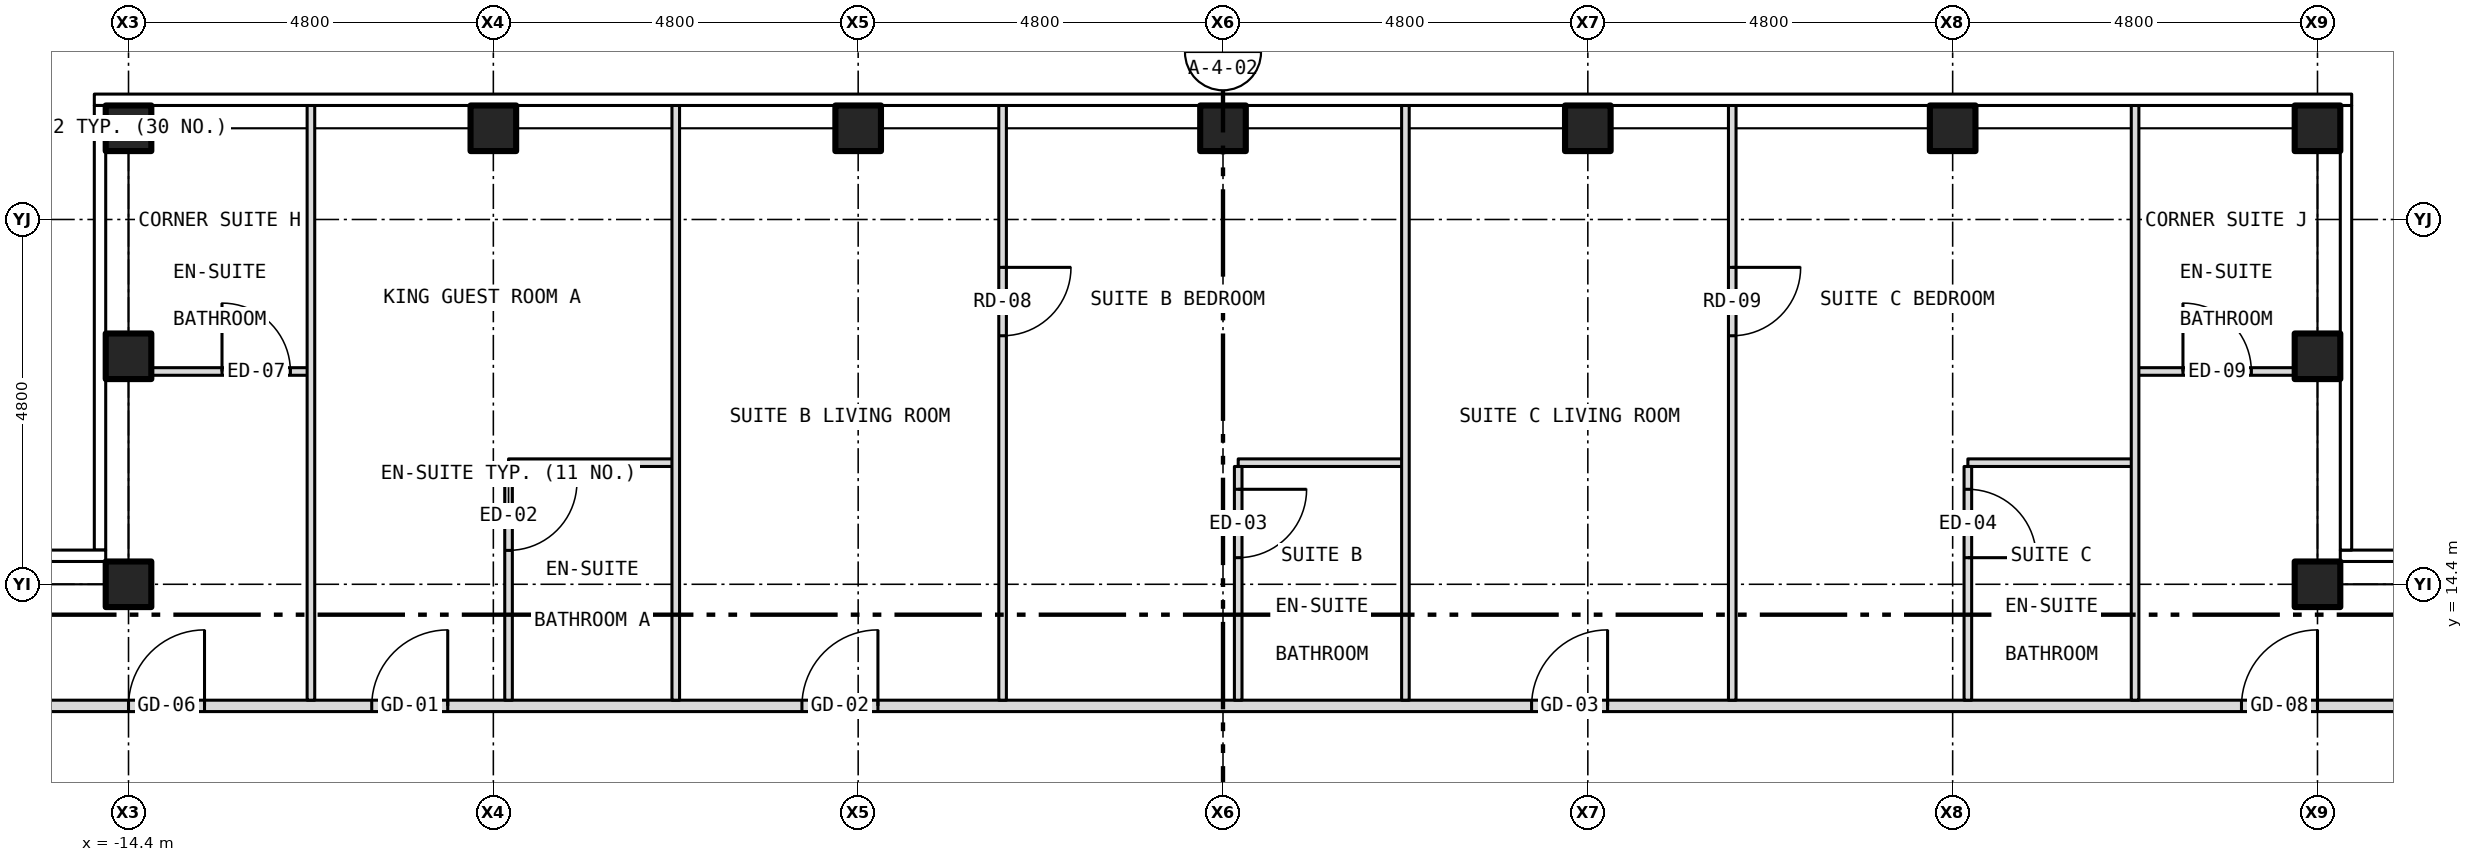
"""IFC4 building model, lengths in metres.
Left out: names, types, materials, properties, quantities, classifications, styles, units other than length and angle.
Written with IfcOpenShell. Run it as: python <this file> out.ifc"""

import sys

from ifc_helpers import new_model, si_unit, direction, frame, frame_2d, origin, origin_2d, place, context, subcontext, project, spatial, rectangle, hollow_rectangle, extrude, element, fill, save


model = new_model("IFC4")
c1 = context("Model", 3, precision=1e-05, world=origin(), true_north=direction((0.0, 1.0)))
c2 = subcontext(c1, "Body", "Model", "MODEL_VIEW")
j1 = project(units=[si_unit("LENGTHUNIT", "METRE"), si_unit("PLANEANGLEUNIT", "RADIAN")], contexts=[c1])
p1 = place(None, origin())
s1 = spatial("IfcSite", under=j1, at=p1, CompositionType="ELEMENT")
p2 = place(p1, origin())
s2 = spatial("IfcBuilding", under=s1, at=p2, CompositionType="ELEMENT")
p3 = place(p2, frame((0.0, 0.0, 251.5)))
s3 = spatial("IfcBuildingStorey", under=s2, at=p3, CompositionType="ELEMENT", Elevation=251.5)
for number, where, z_axis, x_axis in (
    (1, (-14.4, 20.4, -0.15), (0.0, 0.0, 1.0), (1.0, 0.0, 0.0)),
    (2, (-9.6, 20.4, -0.15), (0.0, 0.0, 1.0), (1.0, 0.0, 0.0)),
    (3, (-4.8, 20.4, -0.15), (0.0, 0.0, 1.0), (1.0, 0.0, 0.0)),
    (4, (0.0, 20.4, -0.15), (0.0, 0.0, 1.0), (1.0, 0.0, 0.0)),
    (5, (4.8, 20.4, -0.15), (0.0, 0.0, 1.0), (1.0, 0.0, 0.0)),
    (6, (9.6, 20.4, -0.15), (0.0, 0.0, 1.0), (1.0, 0.0, 0.0)),
    (7, (14.4, 20.4, -0.15), (0.0, 0.0, 1.0), (1.0, 0.0, 0.0)),
    (8, (-14.4, 14.4, -0.15), (0.0, 0.0, 1.0), (1.0, 0.0, 0.0)),
    (9, (-14.4, 17.4, -0.15), (0.0, 0.0, 1.0), (1.0, 0.0, 0.0)),
    (10, (14.4, 14.4, -0.15), (0.0, 0.0, 1.0), (1.0, 0.0, 0.0)),
    (11, (14.4, 17.4, -0.15), (0.0, 0.0, 1.0), (1.0, 0.0, 0.0)),
):
    element("IfcColumn", number, at=place(p3, frame(where, z_axis=z_axis, x_axis=x_axis)), inside=s3, PredefinedType="COLUMN", context=c2, shape_type="SweptSolid", body=[
        extrude(hollow_rectangle(XDim=0.6, YDim=0.6, WallThickness=0.03, at=origin_2d()), origin(), (0.0, 0.0, 1.0), 3.5),
    ])
p4 = place(p3, frame((-15.8, 12.8, 0.0), z_axis=(0.0, 0.0, 1.0), x_axis=(1.0, 0.0, 0.0)))
e12 = element("IfcWall", 12, at=p4, inside=s3, PredefinedType="PARTITIONING", context=c2, shape_type="SweptSolid", body=[
    extrude(rectangle(XDim=31.6, YDim=0.15, at=frame_2d((15.8, 0.0))), origin(), (0.0, 0.0, 1.0), 3.35),
])
p5 = place(p4, frame((4.6, 0.0, 0.0)))
e13 = element("IfcOpeningElement", 13, at=p5, cuts=e12, PredefinedType="OPENING", context=c2, shape_type="SweptSolid", body=[
    extrude(rectangle(XDim=1.0, YDim=2.1, at=frame_2d((0.5, 1.05))), frame((0.0, 0.087, 0.0), z_axis=(0.0, -1.0, 0.0), x_axis=(1.0, 0.0, 0.0)), (0.0, 0.0, 1.0), 0.174),
])
p6 = place(p4, frame((10.26, 0.0, 0.0)))
e14 = element("IfcOpeningElement", 14, at=p6, cuts=e12, PredefinedType="OPENING", context=c2, shape_type="SweptSolid", body=[
    extrude(rectangle(XDim=1.0, YDim=2.1, at=frame_2d((0.5, 1.05))), frame((0.0, 0.087, 0.0), z_axis=(0.0, -1.0, 0.0), x_axis=(1.0, 0.0, 0.0)), (0.0, 0.0, 1.0), 0.174),
])
p7 = place(p4, frame((19.86, 0.0, 0.0)))
e15 = element("IfcOpeningElement", 15, at=p7, cuts=e12, PredefinedType="OPENING", context=c2, shape_type="SweptSolid", body=[
    extrude(rectangle(XDim=1.0, YDim=2.1, at=frame_2d((0.5, 1.05))), frame((0.0, 0.087, 0.0), z_axis=(0.0, -1.0, 0.0), x_axis=(1.0, 0.0, 0.0)), (0.0, 0.0, 1.0), 0.174),
])
p8 = place(p4, frame((1.4, 0.0, 0.0)))
e16 = element("IfcOpeningElement", 16, at=p8, cuts=e12, PredefinedType="OPENING", context=c2, shape_type="SweptSolid", body=[
    extrude(rectangle(XDim=1.0, YDim=2.1, at=frame_2d((0.5, 1.05))), frame((0.0, 0.087, 0.0), z_axis=(0.0, -1.0, 0.0), x_axis=(1.0, 0.0, 0.0)), (0.0, 0.0, 1.0), 0.174),
])
p9 = place(p4, frame((29.2, 0.0, 0.0)))
e17 = element("IfcOpeningElement", 17, at=p9, cuts=e12, PredefinedType="OPENING", context=c2, shape_type="SweptSolid", body=[
    extrude(rectangle(XDim=1.0, YDim=2.1, at=frame_2d((0.5, 1.05))), frame((0.0, 0.087, 0.0), z_axis=(0.0, -1.0, 0.0), x_axis=(1.0, 0.0, 0.0)), (0.0, 0.0, 1.0), 0.174),
])
for number, where, z_axis, x_axis in (
    (18, (-9.4, 16.0, 0.0), (0.0, 0.0, 1.0), (1.0, 0.0, 0.0)),
    (19, (0.2, 16.0, 0.0), (0.0, 0.0, 1.0), (1.0, 0.0, 0.0)),
    (20, (9.8, 16.0, 0.0), (0.0, 0.0, 1.0), (1.0, 0.0, 0.0)),
):
    element("IfcWall", number, at=place(p3, frame(where, z_axis=z_axis, x_axis=x_axis)), inside=s3, PredefinedType="PARTITIONING", context=c2, shape_type="SweptSolid", body=[
        extrude(rectangle(XDim=2.2, YDim=0.1, at=frame_2d((1.1, 0.0))), origin(), (0.0, 0.0, 1.0), 3.35),
    ])
p10 = place(p3, frame((-14.28, 17.2, 0.0), z_axis=(0.0, 0.0, 1.0), x_axis=(1.0, 0.0, 0.0)))
e21 = element("IfcWall", 21, at=p10, inside=s3, PredefinedType="PARTITIONING", context=c2, shape_type="SweptSolid", body=[
    extrude(rectangle(XDim=2.28, YDim=0.1, at=frame_2d((1.14, 0.0))), origin(), (0.0, 0.0, 1.0), 3.35),
])
p11 = place(p10, frame((1.11, 0.0, 0.0)))
e22 = element("IfcOpeningElement", 22, at=p11, cuts=e21, PredefinedType="OPENING", context=c2, shape_type="SweptSolid", body=[
    extrude(rectangle(XDim=0.9, YDim=2.1, at=frame_2d((0.45, 1.05))), frame((0.0, 0.062, 0.0), z_axis=(0.0, -1.0, 0.0), x_axis=(1.0, 0.0, 0.0)), (0.0, 0.0, 1.0), 0.124),
])
p12 = place(p3, frame((12.0, 17.2, 0.0), z_axis=(0.0, 0.0, 1.0), x_axis=(1.0, 0.0, 0.0)))
e23 = element("IfcWall", 23, at=p12, inside=s3, PredefinedType="PARTITIONING", context=c2, shape_type="SweptSolid", body=[
    extrude(rectangle(XDim=2.28, YDim=0.1, at=frame_2d((1.14, 0.0))), origin(), (0.0, 0.0, 1.0), 3.35),
])
p13 = place(p12, frame((0.63, 0.0, 0.0)))
e24 = element("IfcOpeningElement", 24, at=p13, cuts=e23, PredefinedType="OPENING", context=c2, shape_type="SweptSolid", body=[
    extrude(rectangle(XDim=0.9, YDim=2.1, at=frame_2d((0.45, 1.05))), frame((0.0, 0.062, 0.0), z_axis=(0.0, -1.0, 0.0), x_axis=(1.0, 0.0, 0.0)), (0.0, 0.0, 1.0), 0.124),
])
p14 = place(p3, frame((-12.0, 12.875, 0.0), z_axis=(0.0, 0.0, 1.0), x_axis=(0.0, 1.0, 0.0)))
e25 = element("IfcWall", 25, at=p14, inside=s3, PredefinedType="PARTITIONING", context=c2, shape_type="SweptSolid", body=[
    extrude(rectangle(XDim=7.855, YDim=0.1, at=frame_2d((3.927, 0.0))), origin(), (0.0, 0.0, 1.0), 3.35),
])
p15 = place(p3, frame((-9.4, 12.875, 0.0), z_axis=(0.0, 0.0, 1.0), x_axis=(0.0, 1.0, 0.0)))
e26 = element("IfcWall", 26, at=p15, inside=s3, PredefinedType="PARTITIONING", context=c2, shape_type="SweptSolid", body=[
    extrude(rectangle(XDim=3.075, YDim=0.1, at=frame_2d((1.538, 0.0))), origin(), (0.0, 0.0, 1.0), 2.728),
])
p16 = place(p15, frame((1.971, 0.0, 0.0)))
e27 = element("IfcOpeningElement", 27, at=p16, cuts=e26, PredefinedType="OPENING", context=c2, shape_type="SweptSolid", body=[
    extrude(rectangle(XDim=0.9, YDim=2.1, at=frame_2d((0.45, 1.05))), frame((0.0, 0.062, 0.0), z_axis=(0.0, -1.0, 0.0), x_axis=(1.0, 0.0, 0.0)), (0.0, 0.0, 1.0), 0.124),
])
p17 = place(p3, frame((-7.2, 12.875, 0.0), z_axis=(0.0, 0.0, 1.0), x_axis=(0.0, 1.0, 0.0)))
e28 = element("IfcWall", 28, at=p17, inside=s3, PredefinedType="PARTITIONING", context=c2, shape_type="SweptSolid", body=[
    extrude(rectangle(XDim=7.855, YDim=0.1, at=frame_2d((3.927, 0.0))), origin(), (0.0, 0.0, 1.0), 3.35),
])
p18 = place(p3, frame((-2.9, 12.875, 0.0), z_axis=(0.0, 0.0, 1.0), x_axis=(0.0, 1.0, 0.0)))
e29 = element("IfcWall", 29, at=p18, inside=s3, PredefinedType="PARTITIONING", context=c2, shape_type="SweptSolid", body=[
    extrude(rectangle(XDim=7.855, YDim=0.1, at=frame_2d((3.927, 0.0))), origin(), (0.0, 0.0, 1.0), 3.35),
])
p19 = place(p18, frame((4.795, 0.0, 0.0)))
e30 = element("IfcOpeningElement", 30, at=p19, cuts=e29, PredefinedType="OPENING", context=c2, shape_type="SweptSolid", body=[
    extrude(rectangle(XDim=0.9, YDim=2.1, at=frame_2d((0.45, 1.05))), frame((0.0, 0.062, 0.0), z_axis=(0.0, -1.0, 0.0), x_axis=(1.0, 0.0, 0.0)), (0.0, 0.0, 1.0), 0.124),
])
p20 = place(p3, frame((0.2, 12.875, 0.0), z_axis=(0.0, 0.0, 1.0), x_axis=(0.0, 1.0, 0.0)))
e31 = element("IfcWall", 31, at=p20, inside=s3, PredefinedType="PARTITIONING", context=c2, shape_type="SweptSolid", body=[
    extrude(rectangle(XDim=3.075, YDim=0.1, at=frame_2d((1.538, 0.0))), origin(), (0.0, 0.0, 1.0), 2.728),
])
p21 = place(p20, frame((1.875, 0.0, 0.0)))
e32 = element("IfcOpeningElement", 32, at=p21, cuts=e31, PredefinedType="OPENING", context=c2, shape_type="SweptSolid", body=[
    extrude(rectangle(XDim=0.9, YDim=2.1, at=frame_2d((0.45, 1.05))), frame((0.0, 0.062, 0.0), z_axis=(0.0, -1.0, 0.0), x_axis=(1.0, 0.0, 0.0)), (0.0, 0.0, 1.0), 0.124),
])
p22 = place(p3, frame((2.4, 12.875, 0.0), z_axis=(0.0, 0.0, 1.0), x_axis=(0.0, 1.0, 0.0)))
e33 = element("IfcWall", 33, at=p22, inside=s3, PredefinedType="PARTITIONING", context=c2, shape_type="SweptSolid", body=[
    extrude(rectangle(XDim=7.855, YDim=0.1, at=frame_2d((3.927, 0.0))), origin(), (0.0, 0.0, 1.0), 3.35),
])
p23 = place(p3, frame((6.7, 12.875, 0.0), z_axis=(0.0, 0.0, 1.0), x_axis=(0.0, 1.0, 0.0)))
e34 = element("IfcWall", 34, at=p23, inside=s3, PredefinedType="PARTITIONING", context=c2, shape_type="SweptSolid", body=[
    extrude(rectangle(XDim=7.855, YDim=0.1, at=frame_2d((3.927, 0.0))), origin(), (0.0, 0.0, 1.0), 3.35),
])
p24 = place(p23, frame((4.795, 0.0, 0.0)))
e35 = element("IfcOpeningElement", 35, at=p24, cuts=e34, PredefinedType="OPENING", context=c2, shape_type="SweptSolid", body=[
    extrude(rectangle(XDim=0.9, YDim=2.1, at=frame_2d((0.45, 1.05))), frame((0.0, 0.062, 0.0), z_axis=(0.0, -1.0, 0.0), x_axis=(1.0, 0.0, 0.0)), (0.0, 0.0, 1.0), 0.124),
])
p25 = place(p3, frame((9.8, 12.875, 0.0), z_axis=(0.0, 0.0, 1.0), x_axis=(0.0, 1.0, 0.0)))
e36 = element("IfcWall", 36, at=p25, inside=s3, PredefinedType="PARTITIONING", context=c2, shape_type="SweptSolid", body=[
    extrude(rectangle(XDim=3.075, YDim=0.1, at=frame_2d((1.538, 0.0))), origin(), (0.0, 0.0, 1.0), 2.728),
])
p26 = place(p25, frame((1.875, 0.0, 0.0)))
e37 = element("IfcOpeningElement", 37, at=p26, cuts=e36, PredefinedType="OPENING", context=c2, shape_type="SweptSolid", body=[
    extrude(rectangle(XDim=0.9, YDim=2.1, at=frame_2d((0.45, 1.05))), frame((0.0, 0.062, 0.0), z_axis=(0.0, -1.0, 0.0), x_axis=(1.0, 0.0, 0.0)), (0.0, 0.0, 1.0), 0.124),
])
p27 = place(p3, frame((12.0, 12.875, 0.0), z_axis=(0.0, 0.0, 1.0), x_axis=(0.0, 1.0, 0.0)))
e38 = element("IfcWall", 38, at=p27, inside=s3, PredefinedType="PARTITIONING", context=c2, shape_type="SweptSolid", body=[
    extrude(rectangle(XDim=7.855, YDim=0.1, at=frame_2d((3.927, 0.0))), origin(), (0.0, 0.0, 1.0), 3.35),
])
p28 = place(p5, origin())
e39 = element("IfcDoor", 39, at=p28, inside=s3, OperationType="SINGLE_SWING_RIGHT", PredefinedType="DOOR", context=c2, shape_type="SweptSolid", body=[
    extrude(rectangle(XDim=1.0, YDim=2.1, at=frame_2d((0.5, 1.05))), frame((0.0, 0.025, 0.0), z_axis=(0.0, -1.0, 0.0), x_axis=(1.0, 0.0, 0.0)), (0.0, 0.0, 1.0), 0.05),
])
fill(e13, e39)
p29 = place(p16, origin())
e40 = element("IfcDoor", 40, at=p29, inside=s3, OperationType="SINGLE_SWING_RIGHT", PredefinedType="DOOR", context=c2, shape_type="SweptSolid", body=[
    extrude(rectangle(XDim=0.9, YDim=2.1, at=frame_2d((0.45, 1.05))), frame((0.0, 0.025, 0.0), z_axis=(0.0, -1.0, 0.0), x_axis=(1.0, 0.0, 0.0)), (0.0, 0.0, 1.0), 0.05),
])
fill(e27, e40)
p30 = place(p6, origin())
e41 = element("IfcDoor", 41, at=p30, inside=s3, OperationType="SINGLE_SWING_RIGHT", PredefinedType="DOOR", context=c2, shape_type="SweptSolid", body=[
    extrude(rectangle(XDim=1.0, YDim=2.1, at=frame_2d((0.5, 1.05))), frame((0.0, 0.025, 0.0), z_axis=(0.0, -1.0, 0.0), x_axis=(1.0, 0.0, 0.0)), (0.0, 0.0, 1.0), 0.05),
])
fill(e14, e41)
p31 = place(p19, origin())
e42 = element("IfcDoor", 42, at=p31, inside=s3, OperationType="SINGLE_SWING_RIGHT", PredefinedType="DOOR", context=c2, shape_type="SweptSolid", body=[
    extrude(rectangle(XDim=0.9, YDim=2.1, at=frame_2d((0.45, 1.05))), frame((0.0, 0.025, 0.0), z_axis=(0.0, -1.0, 0.0), x_axis=(1.0, 0.0, 0.0)), (0.0, 0.0, 1.0), 0.05),
])
fill(e30, e42)
p32 = place(p21, origin())
e43 = element("IfcDoor", 43, at=p32, inside=s3, OperationType="SINGLE_SWING_RIGHT", PredefinedType="DOOR", context=c2, shape_type="SweptSolid", body=[
    extrude(rectangle(XDim=0.9, YDim=2.1, at=frame_2d((0.45, 1.05))), frame((0.0, 0.025, 0.0), z_axis=(0.0, -1.0, 0.0), x_axis=(1.0, 0.0, 0.0)), (0.0, 0.0, 1.0), 0.05),
])
fill(e32, e43)
p33 = place(p7, origin())
e44 = element("IfcDoor", 44, at=p33, inside=s3, OperationType="SINGLE_SWING_RIGHT", PredefinedType="DOOR", context=c2, shape_type="SweptSolid", body=[
    extrude(rectangle(XDim=1.0, YDim=2.1, at=frame_2d((0.5, 1.05))), frame((0.0, 0.025, 0.0), z_axis=(0.0, -1.0, 0.0), x_axis=(1.0, 0.0, 0.0)), (0.0, 0.0, 1.0), 0.05),
])
fill(e15, e44)
p34 = place(p24, origin())
e45 = element("IfcDoor", 45, at=p34, inside=s3, OperationType="SINGLE_SWING_RIGHT", PredefinedType="DOOR", context=c2, shape_type="SweptSolid", body=[
    extrude(rectangle(XDim=0.9, YDim=2.1, at=frame_2d((0.45, 1.05))), frame((0.0, 0.025, 0.0), z_axis=(0.0, -1.0, 0.0), x_axis=(1.0, 0.0, 0.0)), (0.0, 0.0, 1.0), 0.05),
])
fill(e35, e45)
p35 = place(p26, origin())
e46 = element("IfcDoor", 46, at=p35, inside=s3, OperationType="SINGLE_SWING_LEFT", PredefinedType="DOOR", context=c2, shape_type="SweptSolid", body=[
    extrude(rectangle(XDim=0.9, YDim=2.1, at=frame_2d((0.45, 1.05))), frame((0.0, 0.025, 0.0), z_axis=(0.0, -1.0, 0.0), x_axis=(1.0, 0.0, 0.0)), (0.0, 0.0, 1.0), 0.05),
])
fill(e37, e46)
p36 = place(p11, origin())
e47 = element("IfcDoor", 47, at=p36, inside=s3, OperationType="SINGLE_SWING_LEFT", PredefinedType="DOOR", context=c2, shape_type="SweptSolid", body=[
    extrude(rectangle(XDim=0.9, YDim=2.1, at=frame_2d((0.45, 1.05))), frame((0.0, 0.025, 0.0), z_axis=(0.0, -1.0, 0.0), x_axis=(1.0, 0.0, 0.0)), (0.0, 0.0, 1.0), 0.05),
])
fill(e22, e47)
p37 = place(p8, origin())
e48 = element("IfcDoor", 48, at=p37, inside=s3, OperationType="SINGLE_SWING_RIGHT", PredefinedType="DOOR", context=c2, shape_type="SweptSolid", body=[
    extrude(rectangle(XDim=1.0, YDim=2.1, at=frame_2d((0.5, 1.05))), frame((0.0, 0.025, 0.0), z_axis=(0.0, -1.0, 0.0), x_axis=(1.0, 0.0, 0.0)), (0.0, 0.0, 1.0), 0.05),
])
fill(e16, e48)
p38 = place(p13, origin())
e49 = element("IfcDoor", 49, at=p38, inside=s3, OperationType="SINGLE_SWING_LEFT", PredefinedType="DOOR", context=c2, shape_type="SweptSolid", body=[
    extrude(rectangle(XDim=0.9, YDim=2.1, at=frame_2d((0.45, 1.05))), frame((0.0, 0.025, 0.0), z_axis=(0.0, -1.0, 0.0), x_axis=(1.0, 0.0, 0.0)), (0.0, 0.0, 1.0), 0.05),
])
fill(e24, e49)
p39 = place(p9, origin())
e50 = element("IfcDoor", 50, at=p39, inside=s3, OperationType="SINGLE_SWING_RIGHT", PredefinedType="DOOR", context=c2, shape_type="SweptSolid", body=[
    extrude(rectangle(XDim=1.0, YDim=2.1, at=frame_2d((0.5, 1.05))), frame((0.0, 0.025, 0.0), z_axis=(0.0, -1.0, 0.0), x_axis=(1.0, 0.0, 0.0)), (0.0, 0.0, 1.0), 0.05),
])
fill(e17, e50)
save(model, sys.argv[1])
